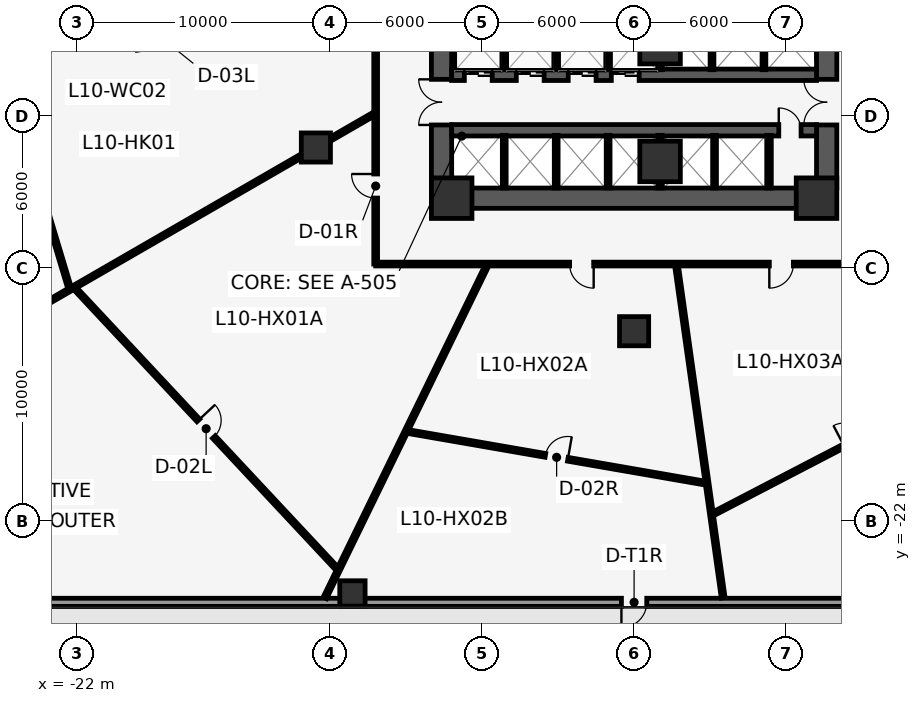
"""IFC4 building model, lengths in metres.
Left out: names, types, materials, properties, quantities, classifications, styles, units other than length and angle.
Written with IfcOpenShell. Run it as: python <this file> out.ifc"""

import sys

from ifc_helpers import new_model, si_unit, direction, frame, frame_2d, origin, origin_2d, place, context, subcontext, project, spatial, rectangle, hollow_rectangle, extrude, element, fill, save


model = new_model("IFC4")
c1 = context("Model", 3, precision=1e-05, world=origin(), true_north=direction((0.0, 1.0)))
c2 = subcontext(c1, "Body", "Model", "MODEL_VIEW")
j1 = project(units=[si_unit("LENGTHUNIT", "METRE"), si_unit("PLANEANGLEUNIT", "RADIAN")], contexts=[c1])
p1 = place(None, origin())
s1 = spatial("IfcSite", under=j1, at=p1, CompositionType="ELEMENT")
p2 = place(p1, origin())
s2 = spatial("IfcBuilding", under=s1, at=p2, CompositionType="ELEMENT")
p3 = place(p2, frame((0.0, 0.0, 50.4)))
s3 = spatial("IfcBuildingStorey", under=s2, at=p3, CompositionType="ELEMENT", Elevation=50.4)
p4 = place(p3, frame((-7.6, -8.85, 0.0), z_axis=(0.0, 0.0, 1.0), x_axis=(0.0, 1.0, 0.0)))
e1 = element("IfcWall", 1, at=p4, inside=s3, PredefinedType="SHEAR", context=c2, shape_type="SweptSolid", body=[
    extrude(rectangle(XDim=8.95, YDim=0.8, at=frame_2d((4.475, 0.0))), origin(), (0.0, 0.0, 1.0), 3.75),
])
p5 = place(p4, frame((2.49, 0.0, 0.0)))
e2 = element("IfcOpeningElement", 2, at=p5, cuts=e1, PredefinedType="OPENING", context=c2, shape_type="SweptSolid", body=[
    extrude(rectangle(XDim=1.8, YDim=2.2, at=frame_2d((0.9, 1.1))), frame((0.0, 0.41, 0.0), z_axis=(0.0, -1.0, 0.0), x_axis=(1.0, 0.0, 0.0)), (0.0, 0.0, 1.0), 0.82),
])
p6 = place(p4, frame((7.4, 0.0, 0.0)))
e3 = element("IfcOpeningElement", 3, at=p6, cuts=e1, PredefinedType="OPENING", context=c2, shape_type="SweptSolid", body=[
    extrude(rectangle(XDim=1.2, YDim=2.15, at=frame_2d((0.6, 1.075))), frame((0.0, 0.41, 0.0), z_axis=(0.0, -1.0, 0.0), x_axis=(1.0, 0.0, 0.0)), (0.0, 0.0, 1.0), 0.82),
])
p7 = place(p3, frame((7.6, -8.85, 0.0), z_axis=(0.0, 0.0, 1.0), x_axis=(0.0, 1.0, 0.0)))
e4 = element("IfcWall", 4, at=p7, inside=s3, PredefinedType="SHEAR", context=c2, shape_type="SweptSolid", body=[
    extrude(rectangle(XDim=8.95, YDim=0.8, at=frame_2d((4.475, 0.0))), origin(), (0.0, 0.0, 1.0), 3.75),
])
p8 = place(p7, frame((2.49, 0.0, 0.0)))
e5 = element("IfcOpeningElement", 5, at=p8, cuts=e4, PredefinedType="OPENING", context=c2, shape_type="SweptSolid", body=[
    extrude(rectangle(XDim=1.8, YDim=2.2, at=frame_2d((0.9, 1.1))), frame((0.0, 0.41, 0.0), z_axis=(0.0, -1.0, 0.0), x_axis=(1.0, 0.0, 0.0)), (0.0, 0.0, 1.0), 0.82),
])
p9 = place(p7, frame((7.4, 0.0, 0.0)))
e6 = element("IfcOpeningElement", 6, at=p9, cuts=e4, PredefinedType="OPENING", context=c2, shape_type="SweptSolid", body=[
    extrude(rectangle(XDim=1.2, YDim=2.15, at=frame_2d((0.6, 1.075))), frame((0.0, 0.41, 0.0), z_axis=(0.0, -1.0, 0.0), x_axis=(1.0, 0.0, 0.0)), (0.0, 0.0, 1.0), 0.82),
])
p10 = place(p3, frame((-7.6, -9.25, 0.0), z_axis=(0.0, 0.0, 1.0), x_axis=(1.0, 0.0, 0.0)))
e7 = element("IfcWall", 7, at=p10, inside=s3, PredefinedType="SHEAR", context=c2, shape_type="SweptSolid", body=[
    extrude(rectangle(XDim=15.2, YDim=0.8, at=frame_2d((7.6, 0.0))), origin(), (0.0, 0.0, 1.0), 3.75),
])
p11 = place(p3, frame((-7.2, -4.38, 0.0), z_axis=(0.0, 0.0, 1.0), x_axis=(1.0, 0.0, 0.0)))
e8 = element("IfcWall", 8, at=p11, inside=s3, PredefinedType="SHEAR", context=c2, shape_type="SweptSolid", body=[
    extrude(rectangle(XDim=14.4, YDim=0.45, at=frame_2d((7.2, 0.0))), origin(), (0.0, 0.0, 1.0), 3.75),
])
p12 = place(p11, frame((0.5, 0.0, 0.0)))
e9 = element("IfcOpeningElement", 9, at=p12, cuts=e8, PredefinedType="OPENING", context=c2, shape_type="SweptSolid", body=[
    extrude(rectangle(XDim=1.1, YDim=2.2, at=frame_2d((0.55, 1.1))), frame((0.0, 0.235, 0.0), z_axis=(0.0, -1.0, 0.0), x_axis=(1.0, 0.0, 0.0)), (0.0, 0.0, 1.0), 0.47),
])
p13 = place(p11, frame((2.55, 0.0, 0.0)))
e10 = element("IfcOpeningElement", 10, at=p13, cuts=e8, PredefinedType="OPENING", context=c2, shape_type="SweptSolid", body=[
    extrude(rectangle(XDim=1.1, YDim=2.2, at=frame_2d((0.55, 1.1))), frame((0.0, 0.235, 0.0), z_axis=(0.0, -1.0, 0.0), x_axis=(1.0, 0.0, 0.0)), (0.0, 0.0, 1.0), 0.47),
])
p14 = place(p11, frame((4.6, 0.0, 0.0)))
e11 = element("IfcOpeningElement", 11, at=p14, cuts=e8, PredefinedType="OPENING", context=c2, shape_type="SweptSolid", body=[
    extrude(rectangle(XDim=1.1, YDim=2.2, at=frame_2d((0.55, 1.1))), frame((0.0, 0.235, 0.0), z_axis=(0.0, -1.0, 0.0), x_axis=(1.0, 0.0, 0.0)), (0.0, 0.0, 1.0), 0.47),
])
p15 = place(p11, frame((6.3, 0.0, 0.0)))
e12 = element("IfcOpeningElement", 12, at=p15, cuts=e8, PredefinedType="OPENING", context=c2, shape_type="SweptSolid", body=[
    extrude(rectangle(XDim=1.1, YDim=2.2, at=frame_2d((0.55, 1.1))), frame((0.0, 0.235, 0.0), z_axis=(0.0, -1.0, 0.0), x_axis=(1.0, 0.0, 0.0)), (0.0, 0.0, 1.0), 0.47),
])
p16 = place(p3, frame((-7.2, -6.57, 0.0), z_axis=(0.0, 0.0, 1.0), x_axis=(1.0, 0.0, 0.0)))
e13 = element("IfcWall", 13, at=p16, inside=s3, PredefinedType="SHEAR", context=c2, shape_type="SweptSolid", body=[
    extrude(rectangle(XDim=14.4, YDim=0.45, at=frame_2d((7.2, 0.0))), origin(), (0.0, 0.0, 1.0), 3.75),
])
p17 = place(p16, frame((12.91, 0.0, 0.0)))
e14 = element("IfcOpeningElement", 14, at=p17, cuts=e13, PredefinedType="OPENING", context=c2, shape_type="SweptSolid", body=[
    extrude(rectangle(XDim=0.88, YDim=2.15, at=frame_2d((0.44, 1.075))), frame((0.0, 0.235, 0.0), z_axis=(0.0, -1.0, 0.0), x_axis=(1.0, 0.0, 0.0)), (0.0, 0.0, 1.0), 0.47),
])
for number, where, z_axis, x_axis in (
    (15, (-7.2, -9.25, 0.0), (0.0, 0.0, 1.0), (1.0, 0.0, 0.0)),
    (16, (7.2, -9.25, 0.0), (0.0, 0.0, 1.0), (1.0, 0.0, 0.0)),
    (17, (1.025, -3.15, 0.0), (0.0, 0.0, 1.0), (1.0, 0.0, 0.0)),
    (18, (1.025, -7.8, 0.0), (0.0, 0.0, 1.0), (1.0, 0.0, 0.0)),
):
    element("IfcColumn", number, at=place(p3, frame(where, z_axis=z_axis, x_axis=x_axis)), inside=s3, PredefinedType="COLUMN", context=c2, shape_type="SweptSolid", body=[
        extrude(rectangle(XDim=1.6, YDim=1.6, at=origin_2d()), origin(), (0.0, 0.0, 1.0), 4.0),
    ])
for number, where, z_axis, x_axis in (
    (19, (-12.56, -7.25, 0.0), (0.0, 0.0, 1.0), (1.0, 0.0, 0.0)),
    (20, (0.0, -14.5, 0.0), (0.0, 0.0, 1.0), (1.0, 0.0, 0.0)),
):
    element("IfcColumn", number, at=place(p3, frame(where, z_axis=z_axis, x_axis=x_axis)), inside=s3, PredefinedType="COLUMN", context=c2, shape_type="SweptSolid", body=[
        extrude(rectangle(XDim=1.15, YDim=1.15, at=origin_2d()), origin(), (0.0, 0.0, 1.0), 4.0),
    ])
p18 = place(p3, frame((-11.117, -24.85, 0.0), z_axis=(0.0, 0.0, 1.0), x_axis=(1.0, 0.0, 0.0)))
e21 = element("IfcColumn", 21, at=p18, inside=s3, PredefinedType="COLUMN", context=c2, shape_type="SweptSolid", body=[
    extrude(hollow_rectangle(XDim=1.0, YDim=1.0, WallThickness=0.06, at=origin_2d()), origin(), (0.0, 0.0, 1.0), 4.0),
])
p19 = place(p3, frame((4.923, 41.122, 0.0), z_axis=(0.0, 0.0, 1.0), x_axis=(0.504213113214, -0.863579258935, 0.0)))
e22 = element("IfcWall", 22, at=p19, inside=s3, PredefinedType="STANDARD", context=c2, shape_type="SweptSolid", body=[
    extrude(rectangle(XDim=67.041, YDim=0.32, at=frame_2d((33.521, 0.0))), origin(), (0.0, 0.0, 1.0), 3.75),
])
p20 = place(p19, frame((33.021, 0.0, 0.0)))
e23 = element("IfcOpeningElement", 23, at=p20, cuts=e22, PredefinedType="OPENING", context=c2, shape_type="SweptSolid", body=[
    extrude(rectangle(XDim=1.0, YDim=2.15, at=frame_2d((0.5, 1.075))), frame((0.0, 0.17, 0.0), z_axis=(0.0, -1.0, 0.0), x_axis=(1.0, 0.0, 0.0)), (0.0, 0.0, 1.0), 0.34),
])
p21 = place(p3, frame((33.888, -25.2, 0.0), z_axis=(0.0, 0.0, 1.0), x_axis=(-1.0, 0.0, 0.0)))
e24 = element("IfcWall", 24, at=p21, inside=s3, PredefinedType="STANDARD", context=c2, shape_type="SweptSolid", body=[
    extrude(rectangle(XDim=67.776, YDim=0.32, at=frame_2d((33.888, 0.0))), origin(), (0.0, 0.0, 1.0), 3.75),
])
p22 = place(p21, frame((33.388, 0.0, 0.0)))
e25 = element("IfcOpeningElement", 25, at=p22, cuts=e24, PredefinedType="OPENING", context=c2, shape_type="SweptSolid", body=[
    extrude(rectangle(XDim=1.0, YDim=2.15, at=frame_2d((0.5, 1.075))), frame((0.0, 0.17, 0.0), z_axis=(0.0, -1.0, 0.0), x_axis=(1.0, 0.0, 0.0)), (0.0, 0.0, 1.0), 0.34),
])
p23 = place(p3, frame((-38.726, -16.773, 0.0), z_axis=(0.0, 0.0, 1.0), x_axis=(0.504213113214, 0.863579258935, 0.0)))
e26 = element("IfcWall", 26, at=p23, inside=s3, PredefinedType="STANDARD", context=c2, shape_type="SweptSolid", body=[
    extrude(rectangle(XDim=67.041, YDim=0.32, at=frame_2d((33.521, 0.0))), origin(), (0.0, 0.0, 1.0), 3.75),
])
p24 = place(p23, frame((33.021, 0.0, 0.0)))
e27 = element("IfcOpeningElement", 27, at=p24, cuts=e26, PredefinedType="OPENING", context=c2, shape_type="SweptSolid", body=[
    extrude(rectangle(XDim=1.0, YDim=2.15, at=frame_2d((0.5, 1.075))), frame((0.0, 0.17, 0.0), z_axis=(0.0, -1.0, 0.0), x_axis=(1.0, 0.0, 0.0)), (0.0, 0.0, 1.0), 0.34),
])
for number, where, z_axis, x_axis in (
    (28, (-5.125, -4.18, 0.0), (0.0, 0.0, 1.0), (0.0, 1.0, 0.0)),
    (29, (-3.075, -4.18, 0.0), (0.0, 0.0, 1.0), (0.0, 1.0, 0.0)),
    (30, (-1.025, -4.18, 0.0), (0.0, 0.0, 1.0), (0.0, 1.0, 0.0)),
):
    element("IfcWall", number, at=place(p3, frame(where, z_axis=z_axis, x_axis=x_axis)), inside=s3, PredefinedType="PARTITIONING", context=c2, shape_type="SweptSolid", body=[
        extrude(rectangle(XDim=2.03, YDim=0.15, at=frame_2d((1.015, 0.0))), origin(), (0.0, 0.0, 1.0), 3.75),
    ])
p25 = place(p3, frame((1.025, -4.18, 0.0), z_axis=(0.0, 0.0, 1.0), x_axis=(0.0, 1.0, 0.0)))
e31 = element("IfcWall", 31, at=p25, inside=s3, PredefinedType="PARTITIONING", context=c2, shape_type="SweptSolid", body=[
    extrude(rectangle(XDim=2.03, YDim=0.18, at=frame_2d((1.015, 0.0))), origin(), (0.0, 0.0, 1.0), 2.798),
])
for number, where, z_axis, x_axis in (
    (32, (3.075, -4.18, 0.0), (0.0, 0.0, 1.0), (0.0, 1.0, 0.0)),
    (33, (5.125, -4.18, 0.0), (0.0, 0.0, 1.0), (0.0, 1.0, 0.0)),
):
    element("IfcWall", number, at=place(p3, frame(where, z_axis=z_axis, x_axis=x_axis)), inside=s3, PredefinedType="PARTITIONING", context=c2, shape_type="SweptSolid", body=[
        extrude(rectangle(XDim=2.03, YDim=0.15, at=frame_2d((1.015, 0.0))), origin(), (0.0, 0.0, 1.0), 3.75),
    ])
for number, where, z_axis, x_axis in (
    (34, (-5.125, -8.85, 0.0), (0.0, 0.0, 1.0), (0.0, 1.0, 0.0)),
    (35, (-3.075, -8.85, 0.0), (0.0, 0.0, 1.0), (0.0, 1.0, 0.0)),
    (36, (-1.025, -8.85, 0.0), (0.0, 0.0, 1.0), (0.0, 1.0, 0.0)),
):
    element("IfcWall", number, at=place(p3, frame(where, z_axis=z_axis, x_axis=x_axis)), inside=s3, PredefinedType="PARTITIONING", context=c2, shape_type="SweptSolid", body=[
        extrude(rectangle(XDim=2.08, YDim=0.15, at=frame_2d((1.04, 0.0))), origin(), (0.0, 0.0, 1.0), 3.75),
    ])
p26 = place(p3, frame((1.025, -8.85, 0.0), z_axis=(0.0, 0.0, 1.0), x_axis=(0.0, 1.0, 0.0)))
e37 = element("IfcWall", 37, at=p26, inside=s3, PredefinedType="PARTITIONING", context=c2, shape_type="SweptSolid", body=[
    extrude(rectangle(XDim=2.08, YDim=0.18, at=frame_2d((1.04, 0.0))), origin(), (0.0, 0.0, 1.0), 2.798),
])
p27 = place(p3, frame((3.175, -8.85, 0.0), z_axis=(0.0, 0.0, 1.0), x_axis=(0.0, 1.0, 0.0)))
e38 = element("IfcWall", 38, at=p27, inside=s3, PredefinedType="PARTITIONING", context=c2, shape_type="SweptSolid", body=[
    extrude(rectangle(XDim=2.08, YDim=0.15, at=frame_2d((1.04, 0.0))), origin(), (0.0, 0.0, 1.0), 3.75),
])
p28 = place(p3, frame((5.325, -8.85, 0.0), z_axis=(0.0, 0.0, 1.0), x_axis=(0.0, 1.0, 0.0)))
e39 = element("IfcWall", 39, at=p28, inside=s3, PredefinedType="PARTITIONING", context=c2, shape_type="SweptSolid", body=[
    extrude(rectangle(XDim=2.08, YDim=0.18, at=frame_2d((1.04, 0.0))), origin(), (0.0, 0.0, 1.0), 3.75),
])
p29 = place(p3, frame((10.2, -11.85, 0.0), z_axis=(0.0, 0.0, 1.0), x_axis=(-1.0, 0.0, 0.0)))
e40 = element("IfcWall", 40, at=p29, inside=s3, PredefinedType="PARTITIONING", context=c2, shape_type="SweptSolid", body=[
    extrude(rectangle(XDim=20.4, YDim=0.15, at=frame_2d((10.2, 0.0))), origin(), (0.0, 0.0, 1.0), 3.75),
])
p30 = place(p29, frame((11.796, 0.0, 0.0)))
e41 = element("IfcOpeningElement", 41, at=p30, cuts=e40, PredefinedType="OPENING", context=c2, shape_type="SweptSolid", body=[
    extrude(rectangle(XDim=0.95, YDim=2.15, at=frame_2d((0.475, 1.075))), frame((0.0, 0.085, 0.0), z_axis=(0.0, -1.0, 0.0), x_axis=(1.0, 0.0, 0.0)), (0.0, 0.0, 1.0), 0.17),
])
p31 = place(p29, frame((3.913, 0.0, 0.0)))
e42 = element("IfcOpeningElement", 42, at=p31, cuts=e40, PredefinedType="OPENING", context=c2, shape_type="SweptSolid", body=[
    extrude(rectangle(XDim=0.95, YDim=2.15, at=frame_2d((0.475, 1.075))), frame((0.0, 0.085, 0.0), z_axis=(0.0, -1.0, 0.0), x_axis=(1.0, 0.0, 0.0)), (0.0, 0.0, 1.0), 0.17),
])
p32 = place(p3, frame((-10.2, -11.85, 0.0), z_axis=(0.0, 0.0, 1.0), x_axis=(0.0, 1.0, 0.0)))
e43 = element("IfcWall", 43, at=p32, inside=s3, PredefinedType="PARTITIONING", context=c2, shape_type="SweptSolid", body=[
    extrude(rectangle(XDim=24.0, YDim=0.15, at=frame_2d((12.0, 0.0))), origin(), (0.0, 0.0, 1.0), 3.75),
])
p33 = place(p32, frame((8.765, 0.0, 0.0)))
e44 = element("IfcOpeningElement", 44, at=p33, cuts=e43, PredefinedType="OPENING", context=c2, shape_type="SweptSolid", body=[
    extrude(rectangle(XDim=0.95, YDim=2.15, at=frame_2d((0.475, 1.075))), frame((0.0, 0.085, 0.0), z_axis=(0.0, -1.0, 0.0), x_axis=(1.0, 0.0, 0.0)), (0.0, 0.0, 1.0), 0.17),
])
p34 = place(p32, frame((2.604, 0.0, 0.0)))
e45 = element("IfcOpeningElement", 45, at=p34, cuts=e43, PredefinedType="OPENING", context=c2, shape_type="SweptSolid", body=[
    extrude(rectangle(XDim=0.95, YDim=2.15, at=frame_2d((0.475, 1.075))), frame((0.0, 0.085, 0.0), z_axis=(0.0, -1.0, 0.0), x_axis=(1.0, 0.0, 0.0)), (0.0, 0.0, 1.0), 0.17),
])
p35 = place(p32, frame((15.759, 0.0, 0.0)))
e46 = element("IfcOpeningElement", 46, at=p35, cuts=e43, PredefinedType="OPENING", context=c2, shape_type="SweptSolid", body=[
    extrude(rectangle(XDim=0.95, YDim=2.15, at=frame_2d((0.475, 1.075))), frame((0.0, 0.085, 0.0), z_axis=(0.0, -1.0, 0.0), x_axis=(1.0, 0.0, 0.0)), (0.0, 0.0, 1.0), 0.17),
])
p36 = place(p3, frame((-10.305, -5.95, 0.0), z_axis=(0.0, 0.0, 1.0), x_axis=(-0.866026683055, -0.499997784232, 0.0)))
e47 = element("IfcWall", 47, at=p36, inside=s3, PredefinedType="PARTITIONING", context=c2, shape_type="SweptSolid", body=[
    extrude(rectangle(XDim=27.709, YDim=0.15, at=frame_2d((13.854, 0.0))), origin(), (0.0, 0.0, 1.0), 2.798),
])
p37 = place(p3, frame((-5.831, -11.955, 0.0), z_axis=(0.0, 0.0, 1.0), x_axis=(-0.438380960837, -0.898789259602, 0.0)))
e48 = element("IfcWall", 48, at=p37, inside=s3, PredefinedType="PARTITIONING", context=c2, shape_type="SweptSolid", body=[
    extrude(rectangle(XDim=14.542, YDim=0.15, at=frame_2d((7.271, 0.0))), origin(), (0.0, 0.0, 1.0), 3.75),
])
p38 = place(p3, frame((1.68, -11.955, 0.0), z_axis=(0.0, 0.0, 1.0), x_axis=(0.139178306215, -0.990267337177, 0.0)))
e49 = element("IfcWall", 49, at=p38, inside=s3, PredefinedType="PARTITIONING", context=c2, shape_type="SweptSolid", body=[
    extrude(rectangle(XDim=13.198, YDim=0.15, at=frame_2d((6.599, 0.0))), origin(), (0.0, 0.0, 1.0), 3.75),
])
p39 = place(p3, frame((-26.691, 1.841, 0.0), z_axis=(0.0, 0.0, 1.0), x_axis=(0.28842068966, -0.957503788909, 0.0)))
e50 = element("IfcWall", 50, at=p39, inside=s3, PredefinedType="PARTITIONING", context=c2, shape_type="SweptSolid", body=[
    extrude(rectangle(XDim=15.322, YDim=0.15, at=frame_2d((7.661, 0.0))), origin(), (0.0, 0.0, 1.0), 3.75),
])
p40 = place(p39, frame((7.186, 0.0, 0.0)))
e51 = element("IfcOpeningElement", 51, at=p40, cuts=e50, PredefinedType="OPENING", context=c2, shape_type="SweptSolid", body=[
    extrude(rectangle(XDim=0.95, YDim=2.15, at=frame_2d((0.475, 1.075))), frame((0.0, 0.085, 0.0), z_axis=(0.0, -1.0, 0.0), x_axis=(1.0, 0.0, 0.0)), (0.0, 0.0, 1.0), 0.17),
])
p41 = place(p3, frame((-22.091, -12.783, 0.0), z_axis=(0.0, 0.0, 1.0), x_axis=(0.682691040269, -0.730707153062, 0.0)))
e52 = element("IfcWall", 52, at=p41, inside=s3, PredefinedType="PARTITIONING", context=c2, shape_type="SweptSolid", body=[
    extrude(rectangle(XDim=15.233, YDim=0.15, at=frame_2d((7.617, 0.0))), origin(), (0.0, 0.0, 1.0), 3.75),
])
p42 = place(p41, frame((7.167, 0.0, 0.0)))
e53 = element("IfcOpeningElement", 53, at=p42, cuts=e52, PredefinedType="OPENING", context=c2, shape_type="SweptSolid", body=[
    extrude(rectangle(XDim=0.9, YDim=2.1, at=frame_2d((0.45, 1.05))), frame((0.0, 0.085, 0.0), z_axis=(0.0, -1.0, 0.0), x_axis=(1.0, 0.0, 0.0)), (0.0, 0.0, 1.0), 0.17),
])
p43 = place(p3, frame((-8.972, -18.453, 0.0), z_axis=(0.0, 0.0, 1.0), x_axis=(0.985300581804, -0.170829632957, 0.0)))
e54 = element("IfcWall", 54, at=p43, inside=s3, PredefinedType="PARTITIONING", context=c2, shape_type="SweptSolid", body=[
    extrude(rectangle(XDim=12.005, YDim=0.15, at=frame_2d((6.002, 0.0))), origin(), (0.0, 0.0, 1.0), 3.254),
])
p44 = place(p43, frame((5.552, 0.0, 0.0)))
e55 = element("IfcOpeningElement", 55, at=p44, cuts=e54, PredefinedType="OPENING", context=c2, shape_type="SweptSolid", body=[
    extrude(rectangle(XDim=0.9, YDim=2.1, at=frame_2d((0.45, 1.05))), frame((0.0, 0.085, 0.0), z_axis=(0.0, -1.0, 0.0), x_axis=(1.0, 0.0, 0.0)), (0.0, 0.0, 1.0), 0.17),
])
p45 = place(p3, frame((3.079, -21.732, 0.0), z_axis=(0.0, 0.0, 1.0), x_axis=(0.887285458414, 0.461220679596, 0.0)))
e56 = element("IfcWall", 56, at=p45, inside=s3, PredefinedType="PARTITIONING", context=c2, shape_type="SweptSolid", body=[
    extrude(rectangle(XDim=12.632, YDim=0.15, at=frame_2d((6.316, 0.0))), origin(), (0.0, 0.0, 1.0), 3.75),
])
p46 = place(p45, frame((5.866, 0.0, 0.0)))
e57 = element("IfcOpeningElement", 57, at=p46, cuts=e56, PredefinedType="OPENING", context=c2, shape_type="SweptSolid", body=[
    extrude(rectangle(XDim=0.9, YDim=2.1, at=frame_2d((0.45, 1.05))), frame((0.0, 0.085, 0.0), z_axis=(0.0, -1.0, 0.0), x_axis=(1.0, 0.0, 0.0)), (0.0, 0.0, 1.0), 0.17),
])
p47 = place(p22, origin())
e58 = element("IfcDoor", 58, at=p47, inside=s3, OperationType="SINGLE_SWING_RIGHT", PredefinedType="DOOR", context=c2, shape_type="SweptSolid", body=[
    extrude(rectangle(XDim=1.0, YDim=2.15, at=frame_2d((0.5, 1.075))), frame((0.0, 0.025, 0.0), z_axis=(0.0, -1.0, 0.0), x_axis=(1.0, 0.0, 0.0)), (0.0, 0.0, 1.0), 0.05),
])
fill(e25, e58)
p48 = place(p12, origin())
e59 = element("IfcDoor", 59, at=p48, inside=s3, OperationType="DOUBLE_DOOR_SLIDING", PredefinedType="DOOR", context=c2, shape_type="SweptSolid", body=[
    extrude(rectangle(XDim=1.1, YDim=2.2, at=frame_2d((0.55, 1.1))), frame((0.0, 0.025, 0.0), z_axis=(0.0, -1.0, 0.0), x_axis=(1.0, 0.0, 0.0)), (0.0, 0.0, 1.0), 0.05),
])
fill(e9, e59)
p49 = place(p13, origin())
e60 = element("IfcDoor", 60, at=p49, inside=s3, OperationType="DOUBLE_DOOR_SLIDING", PredefinedType="DOOR", context=c2, shape_type="SweptSolid", body=[
    extrude(rectangle(XDim=1.1, YDim=2.2, at=frame_2d((0.55, 1.1))), frame((0.0, 0.025, 0.0), z_axis=(0.0, -1.0, 0.0), x_axis=(1.0, 0.0, 0.0)), (0.0, 0.0, 1.0), 0.05),
])
fill(e10, e60)
p50 = place(p14, origin())
e61 = element("IfcDoor", 61, at=p50, inside=s3, OperationType="DOUBLE_DOOR_SLIDING", PredefinedType="DOOR", context=c2, shape_type="SweptSolid", body=[
    extrude(rectangle(XDim=1.1, YDim=2.2, at=frame_2d((0.55, 1.1))), frame((0.0, 0.025, 0.0), z_axis=(0.0, -1.0, 0.0), x_axis=(1.0, 0.0, 0.0)), (0.0, 0.0, 1.0), 0.05),
])
fill(e11, e61)
p51 = place(p15, origin())
e62 = element("IfcDoor", 62, at=p51, inside=s3, OperationType="DOUBLE_DOOR_SLIDING", PredefinedType="DOOR", context=c2, shape_type="SweptSolid", body=[
    extrude(rectangle(XDim=1.1, YDim=2.2, at=frame_2d((0.55, 1.1))), frame((0.0, 0.025, 0.0), z_axis=(0.0, -1.0, 0.0), x_axis=(1.0, 0.0, 0.0)), (0.0, 0.0, 1.0), 0.05),
])
fill(e12, e62)
p52 = place(p5, origin())
e63 = element("IfcDoor", 63, at=p52, inside=s3, OperationType="DOUBLE_DOOR_SINGLE_SWING", PredefinedType="DOOR", context=c2, shape_type="SweptSolid", body=[
    extrude(rectangle(XDim=1.8, YDim=2.2, at=frame_2d((0.9, 1.1))), frame((0.0, 0.025, 0.0), z_axis=(0.0, -1.0, 0.0), x_axis=(1.0, 0.0, 0.0)), (0.0, 0.0, 1.0), 0.05),
])
fill(e2, e63)
p53 = place(p8, origin())
e64 = element("IfcDoor", 64, at=p53, inside=s3, OperationType="DOUBLE_DOOR_SINGLE_SWING", PredefinedType="DOOR", context=c2, shape_type="SweptSolid", body=[
    extrude(rectangle(XDim=1.8, YDim=2.2, at=frame_2d((0.9, 1.1))), frame((0.0, 0.025, 0.0), z_axis=(0.0, -1.0, 0.0), x_axis=(1.0, 0.0, 0.0)), (0.0, 0.0, 1.0), 0.05),
])
fill(e5, e64)
p54 = place(p17, origin())
e65 = element("IfcDoor", 65, at=p54, inside=s3, OperationType="SINGLE_SWING_LEFT", PredefinedType="DOOR", context=c2, shape_type="SweptSolid", body=[
    extrude(rectangle(XDim=0.88, YDim=2.15, at=frame_2d((0.44, 1.075))), frame((0.0, 0.025, 0.0), z_axis=(0.0, -1.0, 0.0), x_axis=(1.0, 0.0, 0.0)), (0.0, 0.0, 1.0), 0.05),
])
fill(e14, e65)
p55 = place(p42, origin())
e66 = element("IfcDoor", 66, at=p55, inside=s3, OperationType="SINGLE_SWING_LEFT", PredefinedType="DOOR", context=c2, shape_type="SweptSolid", body=[
    extrude(rectangle(XDim=0.9, YDim=2.1, at=frame_2d((0.45, 1.05))), frame((0.0, 0.025, 0.0), z_axis=(0.0, -1.0, 0.0), x_axis=(1.0, 0.0, 0.0)), (0.0, 0.0, 1.0), 0.05),
])
fill(e53, e66)
p56 = place(p44, origin())
e67 = element("IfcDoor", 67, at=p56, inside=s3, OperationType="SINGLE_SWING_RIGHT", PredefinedType="DOOR", context=c2, shape_type="SweptSolid", body=[
    extrude(rectangle(XDim=0.9, YDim=2.1, at=frame_2d((0.45, 1.05))), frame((0.0, 0.025, 0.0), z_axis=(0.0, -1.0, 0.0), x_axis=(1.0, 0.0, 0.0)), (0.0, 0.0, 1.0), 0.05),
])
fill(e55, e67)
p57 = place(p34, origin())
e68 = element("IfcDoor", 68, at=p57, inside=s3, OperationType="SINGLE_SWING_RIGHT", PredefinedType="DOOR", context=c2, shape_type="SweptSolid", body=[
    extrude(rectangle(XDim=0.95, YDim=2.15, at=frame_2d((0.475, 1.075))), frame((0.0, 0.025, 0.0), z_axis=(0.0, -1.0, 0.0), x_axis=(1.0, 0.0, 0.0)), (0.0, 0.0, 1.0), 0.05),
])
fill(e45, e68)
p58 = place(p30, origin())
e69 = element("IfcDoor", 69, at=p58, inside=s3, OperationType="SINGLE_SWING_LEFT", PredefinedType="DOOR", context=c2, shape_type="SweptSolid", body=[
    extrude(rectangle(XDim=0.95, YDim=2.15, at=frame_2d((0.475, 1.075))), frame((0.0, 0.025, 0.0), z_axis=(0.0, -1.0, 0.0), x_axis=(1.0, 0.0, 0.0)), (0.0, 0.0, 1.0), 0.05),
])
fill(e41, e69)
p59 = place(p31, origin())
e70 = element("IfcDoor", 70, at=p59, inside=s3, OperationType="SINGLE_SWING_RIGHT", PredefinedType="DOOR", context=c2, shape_type="SweptSolid", body=[
    extrude(rectangle(XDim=0.95, YDim=2.15, at=frame_2d((0.475, 1.075))), frame((0.0, 0.025, 0.0), z_axis=(0.0, -1.0, 0.0), x_axis=(1.0, 0.0, 0.0)), (0.0, 0.0, 1.0), 0.05),
])
fill(e42, e70)
save(model, sys.argv[1])
